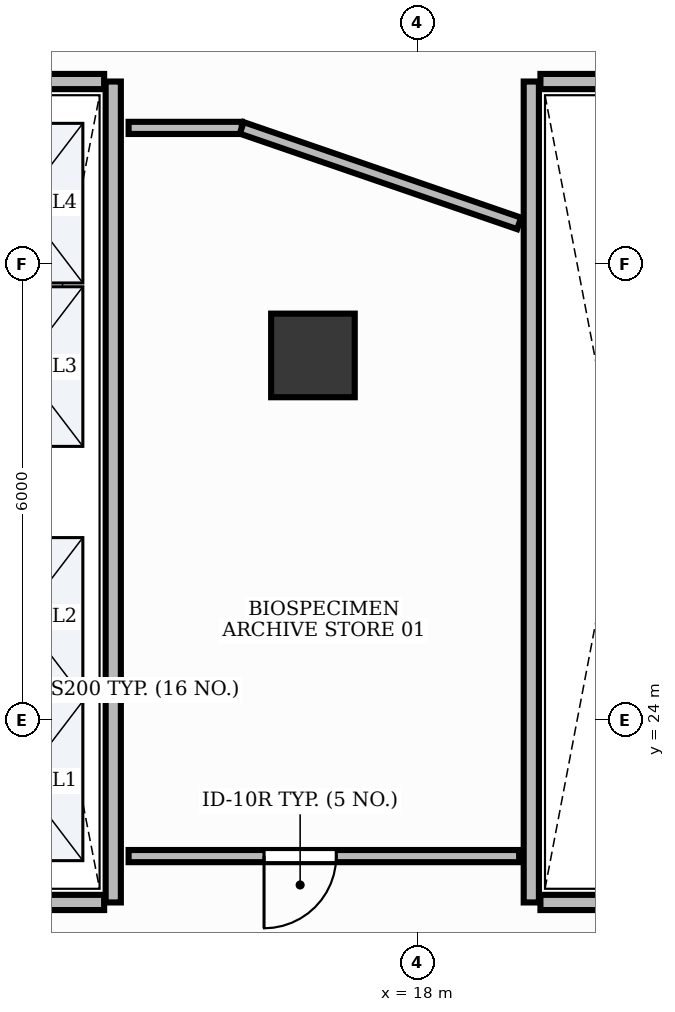
"""IFC4 building model, lengths in metres.
Left out: names, types, materials, properties, quantities, classifications, styles, units other than length and angle.
Written with IfcOpenShell. Run it as: python <this file> out.ifc"""

import sys

from ifc_helpers import new_model, si_unit, direction, frame, frame_2d, origin, origin_2d, place, context, subcontext, project, spatial, rectangle, extrude, element, fill, save


model = new_model("IFC4")
c1 = context("Model", 3, precision=1e-05, world=origin(), true_north=direction((0.0, 1.0)))
c2 = subcontext(c1, "Body", "Model", "MODEL_VIEW")
j1 = project(units=[si_unit("LENGTHUNIT", "METRE"), si_unit("PLANEANGLEUNIT", "RADIAN")], contexts=[c1])
p1 = place(None, origin())
s1 = spatial("IfcSite", under=j1, at=p1, CompositionType="ELEMENT")
p2 = place(p1, origin())
s2 = spatial("IfcBuilding", under=s1, at=p2, CompositionType="ELEMENT")
p3 = place(p2, frame((0.0, 0.0, 123.6)))
s3 = spatial("IfcBuildingStorey", under=s2, at=p3, CompositionType="ELEMENT", Elevation=123.6)
p4 = place(p3, frame((16.627, 28.797, -0.0), z_axis=(0.0, 0.0, 1.0), x_axis=(1.0, 0.0, 0.0)))
e1 = element("IfcColumn", 1, at=p4, inside=s3, PredefinedType="COLUMN", context=c2, shape_type="SweptSolid", body=[
    extrude(rectangle(XDim=1.1, YDim=1.1, at=origin_2d()), origin(), (0.0, 0.0, 1.0), 3.901),
])
p5 = place(p3, frame((14.0, 21.6, 0.0), z_axis=(0.0, 0.0, 1.0), x_axis=(0.0, 1.0, 0.0)))
e2 = element("IfcWall", 2, at=p5, inside=s3, PredefinedType="PARTITIONING", context=c2, shape_type="SweptSolid", body=[
    extrude(rectangle(XDim=10.8, YDim=0.2, at=frame_2d((5.4, 0.0))), origin(), (0.0, 0.0, 1.0), 2.91),
])
for number, where, z_axis, x_axis in (
    (3, (11.72, 21.6, 0.0), (0.0, 0.0, 1.0), (1.0, 0.0, 0.0)),
    (4, (11.72, 32.4, 0.0), (0.0, 0.0, 1.0), (1.0, 0.0, 0.0)),
):
    element("IfcWall", number, at=place(p3, frame(where, z_axis=z_axis, x_axis=x_axis)), inside=s3, PredefinedType="PARTITIONING", context=c2, shape_type="SweptSolid", body=[
        extrude(rectangle(XDim=2.16, YDim=0.2, at=frame_2d((1.08, 0.0))), origin(), (0.0, 0.0, 1.0), 2.91),
    ])
p6 = place(p3, frame((19.5, 21.6, 0.0), z_axis=(0.0, 0.0, 1.0), x_axis=(0.0, 1.0, 0.0)))
e5 = element("IfcWall", 5, at=p6, inside=s3, PredefinedType="PARTITIONING", context=c2, shape_type="SweptSolid", body=[
    extrude(rectangle(XDim=10.8, YDim=0.2, at=frame_2d((5.4, 0.0))), origin(), (0.0, 0.0, 1.0), 2.91),
])
for number, where, z_axis, x_axis in (
    (6, (19.62, 21.6, 0.0), (0.0, 0.0, 1.0), (1.0, 0.0, 0.0)),
    (7, (19.62, 32.4, 0.0), (0.0, 0.0, 1.0), (1.0, 0.0, 0.0)),
):
    element("IfcWall", number, at=place(p3, frame(where, z_axis=z_axis, x_axis=x_axis)), inside=s3, PredefinedType="PARTITIONING", context=c2, shape_type="SweptSolid", body=[
        extrude(rectangle(XDim=2.11, YDim=0.2, at=frame_2d((1.055, 0.0))), origin(), (0.0, 0.0, 1.0), 2.91),
    ])
p7 = place(p3, frame((19.34, 22.21, 0.0), z_axis=(0.0, 0.0, 1.0), x_axis=(-1.0, 0.0, 0.0)))
e8 = element("IfcWall", 8, at=p7, inside=s3, PredefinedType="PARTITIONING", context=c2, shape_type="SweptSolid", body=[
    extrude(rectangle(XDim=5.138, YDim=0.16, at=frame_2d((2.569, 0.0))), origin(), (0.0, 0.0, 1.0), 2.91),
])
p8 = place(p7, frame((2.406, 0.0, 0.0)))
e9 = element("IfcOpeningElement", 9, at=p8, cuts=e8, PredefinedType="OPENING", context=c2, shape_type="SweptSolid", body=[
    extrude(rectangle(XDim=0.95, YDim=2.15, at=frame_2d((0.475, 1.075))), frame((0.0, 0.095, 0.0), z_axis=(0.0, -1.0, 0.0), x_axis=(1.0, 0.0, 0.0)), (0.0, 0.0, 1.0), 0.19),
])
p9 = place(p3, frame((14.202, 31.79, 0.0), z_axis=(0.0, 0.0, 1.0), x_axis=(1.0, 0.0, 0.0)))
e10 = element("IfcWall", 10, at=p9, inside=s3, PredefinedType="PARTITIONING", context=c2, shape_type="SweptSolid", body=[
    extrude(rectangle(XDim=1.489, YDim=0.16, at=frame_2d((0.744, 0.0))), origin(), (0.0, 0.0, 1.0), 2.91),
])
p10 = place(p3, frame((15.69, 31.79, 0.0), z_axis=(0.0, 0.0, 1.0), x_axis=(0.945518754025, -0.32556763627, 0.0)))
e11 = element("IfcWall", 11, at=p10, inside=s3, PredefinedType="PARTITIONING", context=c2, shape_type="SweptSolid", body=[
    extrude(rectangle(XDim=3.86, YDim=0.16, at=frame_2d((1.93, 0.0))), origin(), (0.0, 0.0, 1.0), 2.91),
])
p11 = place(p8, origin())
e12 = element("IfcDoor", 12, at=p11, inside=s3, OperationType="SINGLE_SWING_RIGHT", PredefinedType="DOOR", context=c2, shape_type="SweptSolid", body=[
    extrude(rectangle(XDim=0.95, YDim=2.15, at=frame_2d((0.475, 1.075))), frame((0.0, 0.025, 0.0), z_axis=(0.0, -1.0, 0.0), x_axis=(1.0, 0.0, 0.0)), (0.0, 0.0, 1.0), 0.05),
])
fill(e9, e12)
save(model, sys.argv[1])
